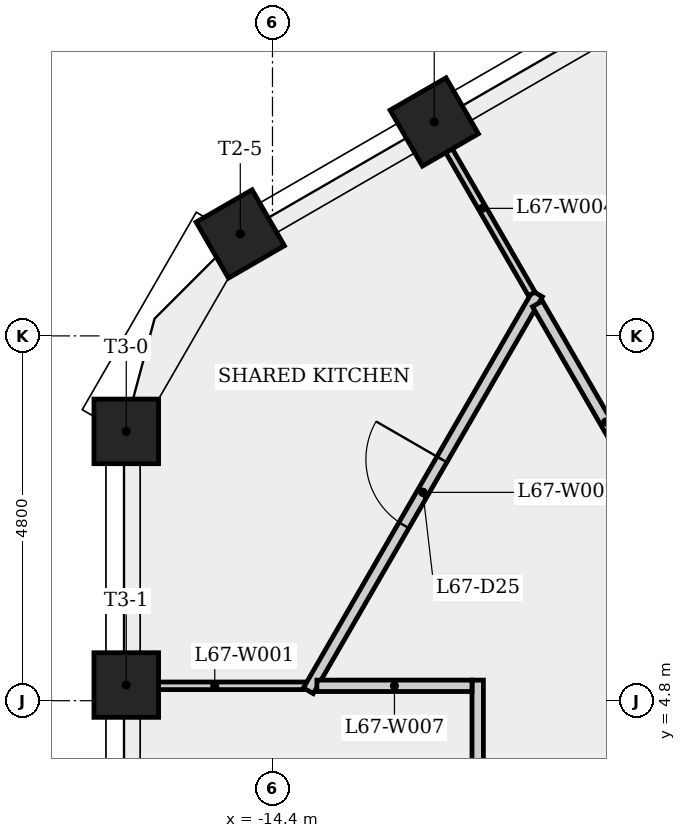
"""IFC4 building model, lengths in metres.
Left out: names, types, materials, properties, quantities, classifications, styles, units other than length and angle.
Written with IfcOpenShell. Run it as: python <this file> out.ifc"""

import sys

from ifc_helpers import new_model, si_unit, direction, frame, frame_2d, origin, origin_2d, place, context, subcontext, project, spatial, rectangle, extrude, element, fill, save


model = new_model("IFC4")
c1 = context("Model", 3, precision=1e-05, world=origin(), true_north=direction((0.0, 1.0)))
c2 = subcontext(c1, "Body", "Model", "MODEL_VIEW")
j1 = project(units=[si_unit("LENGTHUNIT", "METRE"), si_unit("PLANEANGLEUNIT", "RADIAN")], contexts=[c1])
p1 = place(None, origin())
s1 = spatial("IfcSite", under=j1, at=p1, CompositionType="ELEMENT")
p2 = place(p1, origin())
s2 = spatial("IfcBuilding", under=s1, at=p2, CompositionType="ELEMENT")
p3 = place(p2, frame((0.0, 0.0, 249.5)))
s3 = spatial("IfcBuildingStorey", under=s2, at=p3, CompositionType="ELEMENT", Elevation=249.5)
for number, where, z_axis, x_axis in (
    (1, (-9.72, 13.888, 0.0), (0.0, 0.0, 1.0), (-0.5, 0.866, 0.0)),
    (2, (-12.272, 12.415, 0.0), (0.0, 0.0, 1.0), (-0.5, 0.866, 0.0)),
    (3, (-14.824, 10.942, 0.0), (0.0, 0.0, 1.0), (-0.5, 0.866, 0.0)),
    (4, (-16.324, 8.344, 0.0), (0.0, 0.0, 1.0), (-1.0, 0.0, 0.0)),
    (5, (-16.324, 5.006, 0.0), (0.0, 0.0, 1.0), (-1.0, 0.0, 0.0)),
):
    element("IfcColumn", number, at=place(p3, frame(where, z_axis=z_axis, x_axis=x_axis)), inside=s3, PredefinedType="COLUMN", context=c2, shape_type="SweptSolid", body=[
        extrude(rectangle(XDim=0.85, YDim=0.85, at=origin_2d()), origin(), (0.0, 0.0, 1.0), 3.4),
    ])
p4 = place(p3, frame((-13.966, 4.996, 0.0), z_axis=(0.0, 0.0, 1.0), x_axis=(-1.0, 0.0, 0.0)))
e6 = element("IfcWall", 6, at=p4, inside=s3, PredefinedType="PARTITIONING", context=c2, shape_type="SweptSolid", body=[
    extrude(rectangle(XDim=2.388, YDim=0.1, at=frame_2d((1.194, 0.0))), origin(), (0.0, 0.0, 1.0), 3.0),
])
p5 = place(p3, frame((-13.928, 4.931, 0.0), z_axis=(0.0, 0.0, 1.0), x_axis=(0.499980697609, 0.866036547738, 0.0)))
e7 = element("IfcWall", 7, at=p5, inside=s3, PredefinedType="PARTITIONING", context=c2, shape_type="SweptSolid", body=[
    extrude(rectangle(XDim=6.029, YDim=0.15, at=frame_2d((3.014, 0.0))), origin(), (0.0, 0.0, 1.0), 3.0),
])
p6 = place(p5, frame((2.514, 0.0, 0.0)))
e8 = element("IfcOpeningElement", 8, at=p6, cuts=e7, PredefinedType="OPENING", context=c2, shape_type="SweptSolid", body=[
    extrude(rectangle(XDim=1.0, YDim=2.1, at=frame_2d((0.5, 1.05))), frame((0.0, 0.085, 0.0), z_axis=(0.0, -1.0, 0.0), x_axis=(1.0, 0.0, 0.0)), (0.0, 0.0, 1.0), 0.17),
])
p7 = place(p3, frame((-12.29, 12.405, 0.0), z_axis=(0.0, 0.0, 1.0), x_axis=(0.500055541894, -0.865993334282, 0.0)))
e9 = element("IfcWall", 9, at=p7, inside=s3, PredefinedType="PARTITIONING", context=c2, shape_type="SweptSolid", body=[
    extrude(rectangle(XDim=2.601, YDim=0.1, at=frame_2d((1.301, 0.0))), origin(), (0.0, 0.0, 1.0), 3.0),
])
p8 = place(p3, frame((-11.7, -4.996, 0.0), z_axis=(0.0, 0.0, 1.0), x_axis=(0.0, 1.0, 0.0)))
e10 = element("IfcWall", 10, at=p8, inside=s3, PredefinedType="PARTITIONING", context=c2, shape_type="SweptSolid", body=[
    extrude(rectangle(XDim=10.067, YDim=0.15, at=frame_2d((5.033, 0.0))), origin(), (0.0, 0.0, 1.0), 3.0),
])
p9 = place(p8, frame((4.495, 0.0, 0.0)))
e11 = element("IfcOpeningElement", 11, at=p9, cuts=e10, PredefinedType="OPENING", context=c2, shape_type="SweptSolid", body=[
    extrude(rectangle(XDim=1.0, YDim=2.1, at=frame_2d((0.5, 1.05))), frame((0.0, 0.085, 0.0), z_axis=(0.0, -1.0, 0.0), x_axis=(1.0, 0.0, 0.0)), (0.0, 0.0, 1.0), 0.17),
])
p10 = place(p3, frame((-11.775, 4.996, 0.0), z_axis=(0.0, 0.0, 1.0), x_axis=(-1.0, 0.0, 0.0)))
e12 = element("IfcWall", 12, at=p10, inside=s3, PredefinedType="PARTITIONING", context=c2, shape_type="SweptSolid", body=[
    extrude(rectangle(XDim=2.041, YDim=0.15, at=frame_2d((1.021, 0.0))), origin(), (0.0, 0.0, 1.0), 3.0),
])
p11 = place(p3, frame((-10.914, 10.022, 0.0), z_axis=(0.0, 0.0, 1.0), x_axis=(0.499955890556, -0.866050868886, 0.0)))
e13 = element("IfcWall", 13, at=p11, inside=s3, PredefinedType="PARTITIONING", context=c2, shape_type="SweptSolid", body=[
    extrude(rectangle(XDim=3.591, YDim=0.15, at=frame_2d((1.795, 0.0))), origin(), (0.0, 0.0, 1.0), 3.0),
])
p12 = place(p6, origin())
e14 = element("IfcDoor", 14, at=p12, inside=s3, OperationType="SINGLE_SWING_RIGHT", PredefinedType="DOOR", context=c2, shape_type="SweptSolid", body=[
    extrude(rectangle(XDim=1.0, YDim=2.1, at=frame_2d((0.5, 1.05))), frame((0.0, 0.025, 0.0), z_axis=(0.0, -1.0, 0.0), x_axis=(1.0, 0.0, 0.0)), (0.0, 0.0, 1.0), 0.05),
])
fill(e8, e14)
save(model, sys.argv[1])
